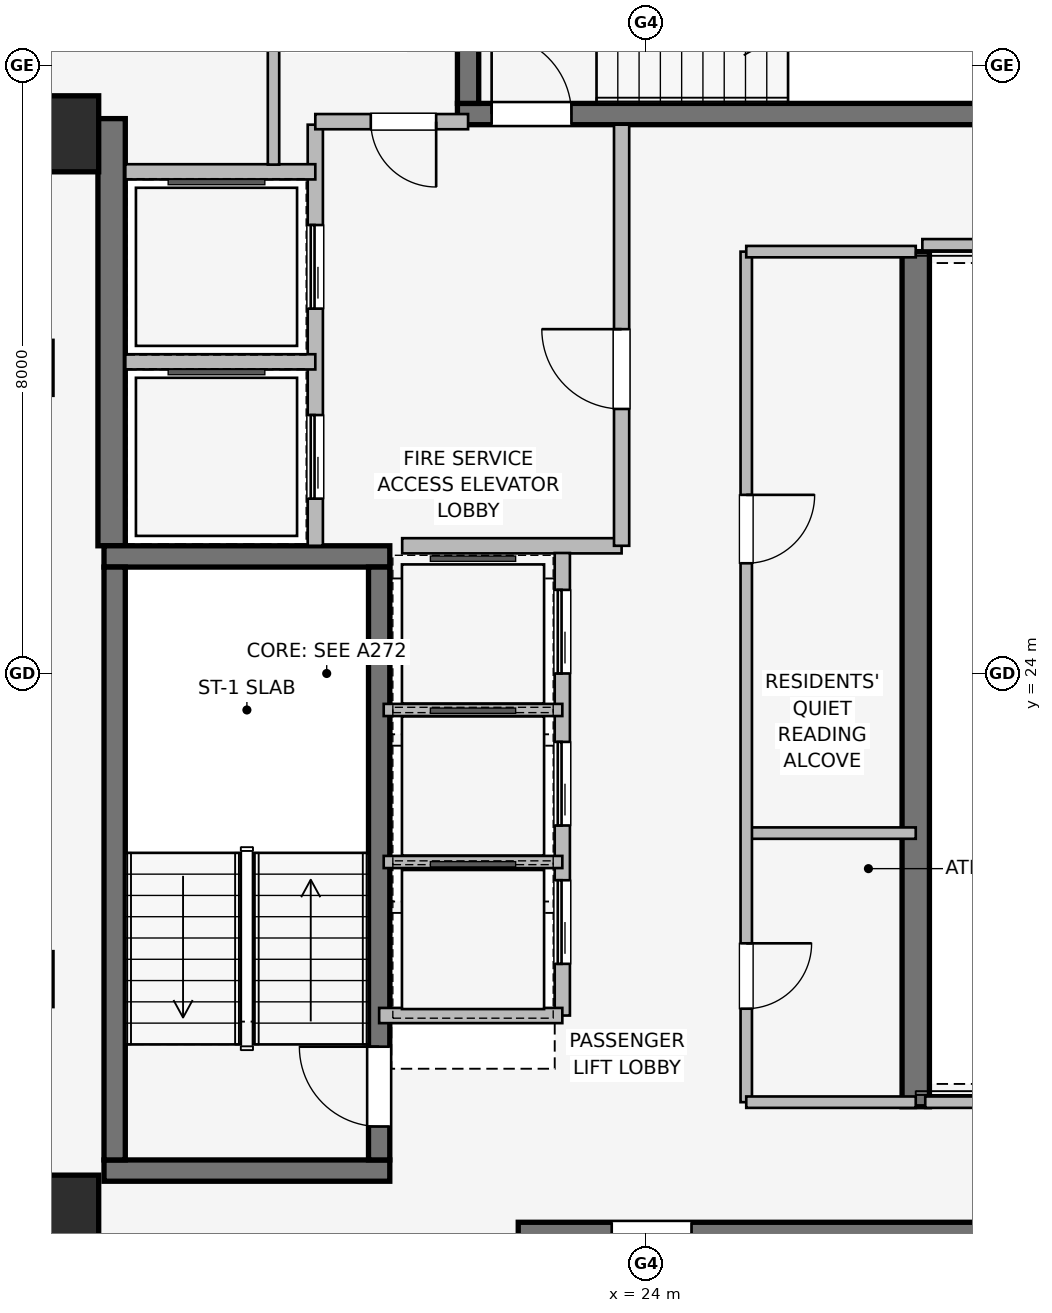
"""IFC4 building model, lengths in metres.
Left out: names, types, materials, properties, quantities, classifications, styles, units other than length and angle.
Written with IfcOpenShell. Run it as: python <this file> out.ifc"""

import sys

from ifc_helpers import new_model, si_unit, direction, frame, frame_2d, origin, origin_2d, place, context, subcontext, project, spatial, rectangle, extrude, element, fill, save


model = new_model("IFC4")
c1 = context("Model", 3, precision=1e-05, world=origin(), true_north=direction((0.0, 1.0)))
c2 = subcontext(c1, "Body", "Model", "MODEL_VIEW")
j1 = project(units=[si_unit("LENGTHUNIT", "METRE"), si_unit("PLANEANGLEUNIT", "RADIAN")], contexts=[c1])
p1 = place(None, origin())
s1 = spatial("IfcSite", under=j1, at=p1, CompositionType="ELEMENT")
p2 = place(p1, origin())
s2 = spatial("IfcBuilding", under=s1, at=p2, CompositionType="ELEMENT")
p3 = place(p2, frame((0.0, 0.0, 256.1)))
s3 = spatial("IfcBuildingStorey", under=s2, at=p3, CompositionType="ELEMENT", Elevation=256.1)
p4 = place(p3, frame((16.97, 25.68, 0.0), z_axis=(0.0, 0.0, 1.0), x_axis=(0.0, 1.0, 0.0)))
e1 = element("IfcWall", 1, at=p4, inside=s3, PredefinedType="SHEAR", context=c2, shape_type="SweptSolid", body=[
    extrude(rectangle(XDim=5.62, YDim=0.36, at=frame_2d((2.81, 0.0))), origin(), (0.0, 0.0, 1.0), 3.55),
])
p5 = place(p3, frame((27.55, 29.55, 0.0), z_axis=(0.0, 0.0, 1.0), x_axis=(0.0, -1.0, 0.0)))
e2 = element("IfcWall", 2, at=p5, inside=s3, PredefinedType="SHEAR", context=c2, shape_type="SweptSolid", body=[
    extrude(rectangle(XDim=11.25, YDim=0.36, at=frame_2d((5.625, 0.0))), origin(), (0.0, 0.0, 1.0), 3.55),
])
for number, where, z_axis, x_axis in (
    (3, (16.87, 17.46, 0.0), (0.0, 0.0, 1.0), (1.0, 0.0, 0.0)),
    (4, (20.63, 25.54, 0.0), (0.0, 0.0, 1.0), (-1.0, 0.0, 0.0)),
):
    element("IfcWall", number, at=place(p3, frame(where, z_axis=z_axis, x_axis=x_axis)), inside=s3, PredefinedType="SHEAR", context=c2, shape_type="SweptSolid", body=[
        extrude(rectangle(XDim=3.76, YDim=0.28, at=frame_2d((1.88, 0.0))), origin(), (0.0, 0.0, 1.0), 3.55),
    ])
p6 = place(p3, frame((17.01, 25.4, 0.0), z_axis=(0.0, 0.0, 1.0), x_axis=(0.0, -1.0, 0.0)))
e5 = element("IfcWall", 5, at=p6, inside=s3, PredefinedType="SHEAR", context=c2, shape_type="SweptSolid", body=[
    extrude(rectangle(XDim=7.8, YDim=0.28, at=frame_2d((3.9, 0.0))), origin(), (0.0, 0.0, 1.0), 3.55),
])
p7 = place(p3, frame((20.49, 17.6, 0.0), z_axis=(0.0, 0.0, 1.0), x_axis=(0.0, 1.0, 0.0)))
e6 = element("IfcWall", 6, at=p7, inside=s3, PredefinedType="SHEAR", context=c2, shape_type="SweptSolid", body=[
    extrude(rectangle(XDim=7.8, YDim=0.28, at=frame_2d((3.9, 0.0))), origin(), (0.0, 0.0, 1.0), 3.55),
])
p8 = place(p7, frame((0.44, 0.0, 0.0)))
e7 = element("IfcOpeningElement", 7, at=p8, cuts=e6, PredefinedType="OPENING", context=c2, shape_type="SweptSolid", body=[
    extrude(rectangle(XDim=1.05, YDim=2.0, at=frame_2d((0.525, 1.0))), frame((0.0, 0.15, 0.0), z_axis=(0.0, -1.0, 0.0), x_axis=(1.0, 0.0, 0.0)), (0.0, 0.0, 1.0), 0.3),
])
p9 = place(p3, frame((30.68, 16.64, 0.0), z_axis=(0.0, 0.0, 1.0), x_axis=(-1.0, 0.0, 0.0)))
e8 = element("IfcWall", 8, at=p9, inside=s3, PredefinedType="SHEAR", context=c2, shape_type="SweptSolid", body=[
    extrude(rectangle(XDim=8.36, YDim=0.28, at=frame_2d((4.18, 0.0))), origin(), (0.0, 0.0, 1.0), 3.55),
])
p10 = place(p9, frame((6.08, 0.0, 0.0)))
e9 = element("IfcOpeningElement", 9, at=p10, cuts=e8, PredefinedType="OPENING", context=c2, shape_type="SweptSolid", body=[
    extrude(rectangle(XDim=1.05, YDim=2.0, at=frame_2d((0.525, 1.0))), frame((0.0, 0.15, 0.0), z_axis=(0.0, -1.0, 0.0), x_axis=(1.0, 0.0, 0.0)), (0.0, 0.0, 1.0), 0.3),
])
p11 = place(p3, frame((21.52, 31.36, 0.0), z_axis=(0.0, 0.0, 1.0), x_axis=(1.0, 0.0, 0.0)))
e10 = element("IfcWall", 10, at=p11, inside=s3, PredefinedType="SHEAR", context=c2, shape_type="SweptSolid", body=[
    extrude(rectangle(XDim=8.36, YDim=0.28, at=frame_2d((4.18, 0.0))), origin(), (0.0, 0.0, 1.0), 3.55),
])
p12 = place(p11, frame((0.45, 0.0, 0.0)))
e11 = element("IfcOpeningElement", 11, at=p12, cuts=e10, PredefinedType="OPENING", context=c2, shape_type="SweptSolid", body=[
    extrude(rectangle(XDim=1.05, YDim=2.0, at=frame_2d((0.525, 1.0))), frame((0.0, 0.15, 0.0), z_axis=(0.0, -1.0, 0.0), x_axis=(1.0, 0.0, 0.0)), (0.0, 0.0, 1.0), 0.3),
])
p13 = place(p3, frame((21.66, 34.7, 0.0), z_axis=(0.0, 0.0, 1.0), x_axis=(0.0, -1.0, 0.0)))
e12 = element("IfcWall", 12, at=p13, inside=s3, PredefinedType="SHEAR", context=c2, shape_type="SweptSolid", body=[
    extrude(rectangle(XDim=3.2, YDim=0.28, at=frame_2d((1.6, 0.0))), origin(), (0.0, 0.0, 1.0), 3.55),
])
for number, where, z_axis, x_axis in (
    (13, (16.3, 16.9, 0.0), (0.0, 0.0, 1.0), (1.0, 0.0, 0.0)),
    (14, (16.3, 31.1, 0.0), (0.0, 0.0, 1.0), (1.0, 0.0, 0.0)),
):
    element("IfcColumn", number, at=place(p3, frame(where, z_axis=z_axis, x_axis=x_axis)), inside=s3, PredefinedType="COLUMN", context=c2, shape_type="SweptSolid", body=[
        extrude(rectangle(XDim=1.0, YDim=1.0, at=origin_2d()), origin(), (0.0, 0.0, 1.0), 3.55),
    ])
p14 = place(p3, frame((15.574, 32.082, 0.0), z_axis=(0.0, 0.0, 1.0), x_axis=(0.520325409202, 0.853968072318, 0.0)))
e15 = element("IfcWall", 15, at=p14, inside=s3, PredefinedType="STANDARD", context=c2, shape_type="SweptSolid", body=[
    extrude(rectangle(XDim=1.678, YDim=0.33, at=frame_2d((0.839, 0.0))), origin(), (0.0, 0.0, 1.0), 3.29),
])
p15 = place(p3, frame((19.65, 25.68, 0.0), z_axis=(0.0, 0.0, 1.0), x_axis=(0.0, 1.0, 0.0)))
e16 = element("IfcWall", 16, at=p15, inside=s3, PredefinedType="PARTITIONING", context=c2, shape_type="SweptSolid", body=[
    extrude(rectangle(XDim=5.54, YDim=0.2, at=frame_2d((2.77, 0.0))), origin(), (0.0, 0.0, 1.0), 3.29),
])
p16 = place(p15, frame((0.62, 0.0, 0.0)))
e17 = element("IfcOpeningElement", 17, at=p16, cuts=e16, PredefinedType="OPENING", context=c2, shape_type="SweptSolid", body=[
    extrude(rectangle(XDim=1.1, YDim=2.2, at=frame_2d((0.55, 1.1))), frame((0.0, 0.11, 0.0), z_axis=(0.0, -1.0, 0.0), x_axis=(1.0, 0.0, 0.0)), (0.0, 0.0, 1.0), 0.22),
])
p17 = place(p15, frame((3.12, 0.0, 0.0)))
e18 = element("IfcOpeningElement", 18, at=p17, cuts=e16, PredefinedType="OPENING", context=c2, shape_type="SweptSolid", body=[
    extrude(rectangle(XDim=1.1, YDim=2.2, at=frame_2d((0.55, 1.1))), frame((0.0, 0.11, 0.0), z_axis=(0.0, -1.0, 0.0), x_axis=(1.0, 0.0, 0.0)), (0.0, 0.0, 1.0), 0.22),
])
p18 = place(p3, frame((20.793, 25.68, 0.0), z_axis=(0.0, 0.0, 1.0), x_axis=(1.0, 0.0, 0.0)))
e19 = element("IfcWall", 19, at=p18, inside=s3, PredefinedType="PARTITIONING", context=c2, shape_type="SweptSolid", body=[
    extrude(rectangle(XDim=2.887, YDim=0.2, at=frame_2d((1.443, 0.0))), origin(), (0.0, 0.0, 1.0), 3.29),
])
p19 = place(p3, frame((23.68, 25.68, 0.0), z_axis=(0.0, 0.0, 1.0), x_axis=(0.0, 1.0, 0.0)))
e20 = element("IfcWall", 20, at=p19, inside=s3, PredefinedType="PARTITIONING", context=c2, shape_type="SweptSolid", body=[
    extrude(rectangle(XDim=5.54, YDim=0.2, at=frame_2d((2.77, 0.0))), origin(), (0.0, 0.0, 1.0), 3.29),
])
p20 = place(p19, frame((1.8, 0.0, 0.0)))
e21 = element("IfcOpeningElement", 21, at=p20, cuts=e20, PredefinedType="OPENING", context=c2, shape_type="SweptSolid", body=[
    extrude(rectangle(XDim=1.05, YDim=2.0, at=frame_2d((0.525, 1.0))), frame((0.0, 0.11, 0.0), z_axis=(0.0, -1.0, 0.0), x_axis=(1.0, 0.0, 0.0)), (0.0, 0.0, 1.0), 0.22),
])
p21 = place(p3, frame((21.66, 31.26, 0.0), z_axis=(0.0, 0.0, 1.0), x_axis=(-1.0, 0.0, 0.0)))
e22 = element("IfcWall", 22, at=p21, inside=s3, PredefinedType="PARTITIONING", context=c2, shape_type="SweptSolid", body=[
    extrude(rectangle(XDim=2.01, YDim=0.2, at=frame_2d((1.005, 0.0))), origin(), (0.0, 0.0, 1.0), 3.29),
])
p22 = place(p21, frame((0.42, 0.0, 0.0)))
e23 = element("IfcOpeningElement", 23, at=p22, cuts=e22, PredefinedType="OPENING", context=c2, shape_type="SweptSolid", body=[
    extrude(rectangle(XDim=0.86, YDim=2.0, at=frame_2d((0.43, 1.0))), frame((0.0, 0.11, 0.0), z_axis=(0.0, -1.0, 0.0), x_axis=(1.0, 0.0, 0.0)), (0.0, 0.0, 1.0), 0.22),
])
p23 = place(p3, frame((17.15, 28.1, 0.0), z_axis=(0.0, 0.0, 1.0), x_axis=(1.0, 0.0, 0.0)))
e24 = element("IfcWall", 24, at=p23, inside=s3, PredefinedType="PARTITIONING", context=c2, shape_type="SweptSolid", body=[
    extrude(rectangle(XDim=2.5, YDim=0.2, at=frame_2d((1.25, 0.0))), origin(), (0.0, 0.0, 1.0), 3.29),
])
p24 = place(p3, frame((19.65, 30.6, 0.0), z_axis=(0.0, 0.0, 1.0), x_axis=(-1.0, 0.0, 0.0)))
e25 = element("IfcWall", 25, at=p24, inside=s3, PredefinedType="PARTITIONING", context=c2, shape_type="SweptSolid", body=[
    extrude(rectangle(XDim=2.5, YDim=0.2, at=frame_2d((1.25, 0.0))), origin(), (0.0, 0.0, 1.0), 2.19),
])
p25 = place(p3, frame((22.9, 19.5, 0.0), z_axis=(0.0, 0.0, 1.0), x_axis=(0.0, 1.0, 0.0)))
e26 = element("IfcWall", 26, at=p25, inside=s3, PredefinedType="PARTITIONING", context=c2, shape_type="SweptSolid", body=[
    extrude(rectangle(XDim=6.085, YDim=0.2, at=frame_2d((3.042, 0.0))), origin(), (0.0, 0.0, 1.0), 3.29),
])
p26 = place(p25, frame((0.68, 0.0, 0.0)))
e27 = element("IfcOpeningElement", 27, at=p26, cuts=e26, PredefinedType="OPENING", context=c2, shape_type="SweptSolid", body=[
    extrude(rectangle(XDim=1.1, YDim=2.2, at=frame_2d((0.55, 1.1))), frame((0.0, 0.11, 0.0), z_axis=(0.0, -1.0, 0.0), x_axis=(1.0, 0.0, 0.0)), (0.0, 0.0, 1.0), 0.22),
])
p27 = place(p25, frame((2.5, 0.0, 0.0)))
e28 = element("IfcOpeningElement", 28, at=p27, cuts=e26, PredefinedType="OPENING", context=c2, shape_type="SweptSolid", body=[
    extrude(rectangle(XDim=1.1, YDim=2.2, at=frame_2d((0.55, 1.1))), frame((0.0, 0.11, 0.0), z_axis=(0.0, -1.0, 0.0), x_axis=(1.0, 0.0, 0.0)), (0.0, 0.0, 1.0), 0.22),
])
p28 = place(p25, frame((4.5, 0.0, 0.0)))
e29 = element("IfcOpeningElement", 29, at=p28, cuts=e26, PredefinedType="OPENING", context=c2, shape_type="SweptSolid", body=[
    extrude(rectangle(XDim=1.1, YDim=2.2, at=frame_2d((0.55, 1.1))), frame((0.0, 0.11, 0.0), z_axis=(0.0, -1.0, 0.0), x_axis=(1.0, 0.0, 0.0)), (0.0, 0.0, 1.0), 0.22),
])
p29 = place(p3, frame((20.49, 19.5, 0.0), z_axis=(0.0, 0.0, 1.0), x_axis=(1.0, 0.0, 0.0)))
e30 = element("IfcWall", 30, at=p29, inside=s3, PredefinedType="PARTITIONING", context=c2, shape_type="SweptSolid", body=[
    extrude(rectangle(XDim=2.41, YDim=0.2, at=frame_2d((1.205, 0.0))), origin(), (0.0, 0.0, 1.0), 2.19),
])
for number, where, z_axis, x_axis in (
    (31, (20.55, 21.52, 0.0), (0.0, 0.0, 1.0), (1.0, 0.0, 0.0)),
    (32, (20.55, 23.52, 0.0), (0.0, 0.0, 1.0), (1.0, 0.0, 0.0)),
):
    element("IfcWall", number, at=place(p3, frame(where, z_axis=z_axis, x_axis=x_axis)), inside=s3, PredefinedType="PARTITIONING", context=c2, shape_type="SweptSolid", body=[
        extrude(rectangle(XDim=2.35, YDim=0.16, at=frame_2d((1.175, 0.0))), origin(), (0.0, 0.0, 1.0), 3.29),
    ])
p30 = place(p3, frame((25.32, 21.9, 0.0), z_axis=(0.0, 0.0, 1.0), x_axis=(1.0, 0.0, 0.0)))
e33 = element("IfcWall", 33, at=p30, inside=s3, PredefinedType="PARTITIONING", context=c2, shape_type="SweptSolid", body=[
    extrude(rectangle(XDim=2.23, YDim=0.15, at=frame_2d((1.115, 0.0))), origin(), (0.0, 0.0, 1.0), 3.29),
])
p31 = place(p3, frame((25.32, 29.55, 0.0), z_axis=(0.0, 0.0, 1.0), x_axis=(0.0, -1.0, 0.0)))
e34 = element("IfcWall", 34, at=p31, inside=s3, PredefinedType="PARTITIONING", context=c2, shape_type="SweptSolid", body=[
    extrude(rectangle(XDim=11.19, YDim=0.15, at=frame_2d((5.595, 0.0))), origin(), (0.0, 0.0, 1.0), 3.29),
])
p32 = place(p31, frame((3.2, 0.0, 0.0)))
e35 = element("IfcOpeningElement", 35, at=p32, cuts=e34, PredefinedType="OPENING", context=c2, shape_type="SweptSolid", body=[
    extrude(rectangle(XDim=0.9, YDim=2.0, at=frame_2d((0.45, 1.0))), frame((0.0, 0.085, 0.0), z_axis=(0.0, -1.0, 0.0), x_axis=(1.0, 0.0, 0.0)), (0.0, 0.0, 1.0), 0.17),
])
p33 = place(p31, frame((9.1, 0.0, 0.0)))
e36 = element("IfcOpeningElement", 36, at=p33, cuts=e34, PredefinedType="OPENING", context=c2, shape_type="SweptSolid", body=[
    extrude(rectangle(XDim=0.86, YDim=2.0, at=frame_2d((0.43, 1.0))), frame((0.0, 0.085, 0.0), z_axis=(0.0, -1.0, 0.0), x_axis=(1.0, 0.0, 0.0)), (0.0, 0.0, 1.0), 0.17),
])
p34 = place(p3, frame((25.32, 18.36, 0.0), z_axis=(0.0, 0.0, 1.0), x_axis=(1.0, 0.0, 0.0)))
e37 = element("IfcWall", 37, at=p34, inside=s3, PredefinedType="PARTITIONING", context=c2, shape_type="SweptSolid", body=[
    extrude(rectangle(XDim=2.23, YDim=0.15, at=frame_2d((1.115, 0.0))), origin(), (0.0, 0.0, 1.0), 3.29),
])
p35 = place(p3, frame((27.55, 29.55, 0.0), z_axis=(0.0, 0.0, 1.0), x_axis=(-1.0, 0.0, 0.0)))
e38 = element("IfcWall", 38, at=p35, inside=s3, PredefinedType="PARTITIONING", context=c2, shape_type="SweptSolid", body=[
    extrude(rectangle(XDim=2.23, YDim=0.15, at=frame_2d((1.115, 0.0))), origin(), (0.0, 0.0, 1.0), 2.19),
])
p36 = place(p3, frame((19.1, 33.35, 0.0), z_axis=(0.0, 0.0, 1.0), x_axis=(0.0, -1.0, 0.0)))
e39 = element("IfcWall", 39, at=p36, inside=s3, PredefinedType="PARTITIONING", context=c2, shape_type="SweptSolid", body=[
    extrude(rectangle(XDim=2.655, YDim=0.15, at=frame_2d((1.328, 0.0))), origin(), (0.0, 0.0, 1.0), 3.29),
])
p37 = place(p3, frame((27.675, 18.36, 0.0), z_axis=(0.0, 0.0, 1.0), x_axis=(1.0, 0.0, 0.0)))
e40 = element("IfcWall", 40, at=p37, inside=s3, PredefinedType="PARTITIONING", context=c2, shape_type="SweptSolid", body=[
    extrude(rectangle(XDim=12.165, YDim=0.15, at=frame_2d((6.083, 0.0))), origin(), (0.0, 0.0, 1.0), 2.431),
])
p38 = place(p3, frame((39.84, 29.64, 0.0), z_axis=(0.0, 0.0, 1.0), x_axis=(-1.0, 0.0, 0.0)))
e41 = element("IfcWall", 41, at=p38, inside=s3, PredefinedType="PARTITIONING", context=c2, shape_type="SweptSolid", body=[
    extrude(rectangle(XDim=12.203, YDim=0.15, at=frame_2d((6.102, 0.0))), origin(), (0.0, 0.0, 1.0), 2.431),
])
p39 = place(p8, origin())
e42 = element("IfcDoor", 42, at=p39, inside=s3, OperationType="SINGLE_SWING_RIGHT", PredefinedType="DOOR", context=c2, shape_type="SweptSolid", body=[
    extrude(rectangle(XDim=1.05, YDim=2.0, at=frame_2d((0.525, 1.0))), frame((0.0, 0.025, 0.0), z_axis=(0.0, -1.0, 0.0), x_axis=(1.0, 0.0, 0.0)), (0.0, 0.0, 1.0), 0.05),
])
fill(e7, e42)
p40 = place(p10, origin())
e43 = element("IfcDoor", 43, at=p40, inside=s3, OperationType="SINGLE_SWING_RIGHT", PredefinedType="DOOR", context=c2, shape_type="SweptSolid", body=[
    extrude(rectangle(XDim=1.05, YDim=2.0, at=frame_2d((0.525, 1.0))), frame((0.0, 0.025, 0.0), z_axis=(0.0, -1.0, 0.0), x_axis=(1.0, 0.0, 0.0)), (0.0, 0.0, 1.0), 0.05),
])
fill(e9, e43)
p41 = place(p12, origin())
e44 = element("IfcDoor", 44, at=p41, inside=s3, OperationType="SINGLE_SWING_LEFT", PredefinedType="DOOR", context=c2, shape_type="SweptSolid", body=[
    extrude(rectangle(XDim=1.05, YDim=2.0, at=frame_2d((0.525, 1.0))), frame((0.0, 0.025, 0.0), z_axis=(0.0, -1.0, 0.0), x_axis=(1.0, 0.0, 0.0)), (0.0, 0.0, 1.0), 0.05),
])
fill(e11, e44)
p42 = place(p16, origin())
e45 = element("IfcDoor", 45, at=p42, inside=s3, OperationType="SLIDING_TO_LEFT", PredefinedType="DOOR", context=c2, shape_type="SweptSolid", body=[
    extrude(rectangle(XDim=1.1, YDim=2.2, at=frame_2d((0.55, 1.1))), frame((0.0, 0.025, 0.0), z_axis=(0.0, -1.0, 0.0), x_axis=(1.0, 0.0, 0.0)), (0.0, 0.0, 1.0), 0.05),
])
fill(e17, e45)
p43 = place(p17, origin())
e46 = element("IfcDoor", 46, at=p43, inside=s3, OperationType="SLIDING_TO_LEFT", PredefinedType="DOOR", context=c2, shape_type="SweptSolid", body=[
    extrude(rectangle(XDim=1.1, YDim=2.2, at=frame_2d((0.55, 1.1))), frame((0.0, 0.025, 0.0), z_axis=(0.0, -1.0, 0.0), x_axis=(1.0, 0.0, 0.0)), (0.0, 0.0, 1.0), 0.05),
])
fill(e18, e46)
p44 = place(p20, origin())
e47 = element("IfcDoor", 47, at=p44, inside=s3, OperationType="SINGLE_SWING_RIGHT", PredefinedType="DOOR", context=c2, shape_type="SweptSolid", body=[
    extrude(rectangle(XDim=1.05, YDim=2.0, at=frame_2d((0.525, 1.0))), frame((0.0, 0.025, 0.0), z_axis=(0.0, -1.0, 0.0), x_axis=(1.0, 0.0, 0.0)), (0.0, 0.0, 1.0), 0.05),
])
fill(e21, e47)
p45 = place(p22, origin())
e48 = element("IfcDoor", 48, at=p45, inside=s3, OperationType="SINGLE_SWING_LEFT", PredefinedType="DOOR", context=c2, shape_type="SweptSolid", body=[
    extrude(rectangle(XDim=0.86, YDim=2.0, at=frame_2d((0.43, 1.0))), frame((0.0, 0.025, 0.0), z_axis=(0.0, -1.0, 0.0), x_axis=(1.0, 0.0, 0.0)), (0.0, 0.0, 1.0), 0.05),
])
fill(e23, e48)
p46 = place(p26, origin())
e49 = element("IfcDoor", 49, at=p46, inside=s3, OperationType="SLIDING_TO_LEFT", PredefinedType="DOOR", context=c2, shape_type="SweptSolid", body=[
    extrude(rectangle(XDim=1.1, YDim=2.2, at=frame_2d((0.55, 1.1))), frame((0.0, 0.025, 0.0), z_axis=(0.0, -1.0, 0.0), x_axis=(1.0, 0.0, 0.0)), (0.0, 0.0, 1.0), 0.05),
])
fill(e27, e49)
p47 = place(p27, origin())
e50 = element("IfcDoor", 50, at=p47, inside=s3, OperationType="SLIDING_TO_LEFT", PredefinedType="DOOR", context=c2, shape_type="SweptSolid", body=[
    extrude(rectangle(XDim=1.1, YDim=2.2, at=frame_2d((0.55, 1.1))), frame((0.0, 0.025, 0.0), z_axis=(0.0, -1.0, 0.0), x_axis=(1.0, 0.0, 0.0)), (0.0, 0.0, 1.0), 0.05),
])
fill(e28, e50)
p48 = place(p28, origin())
e51 = element("IfcDoor", 51, at=p48, inside=s3, OperationType="SLIDING_TO_LEFT", PredefinedType="DOOR", context=c2, shape_type="SweptSolid", body=[
    extrude(rectangle(XDim=1.1, YDim=2.2, at=frame_2d((0.55, 1.1))), frame((0.0, 0.025, 0.0), z_axis=(0.0, -1.0, 0.0), x_axis=(1.0, 0.0, 0.0)), (0.0, 0.0, 1.0), 0.05),
])
fill(e29, e51)
p49 = place(p32, origin())
e52 = element("IfcDoor", 52, at=p49, inside=s3, OperationType="SINGLE_SWING_LEFT", PredefinedType="DOOR", context=c2, shape_type="SweptSolid", body=[
    extrude(rectangle(XDim=0.9, YDim=2.0, at=frame_2d((0.45, 1.0))), frame((0.0, 0.025, 0.0), z_axis=(0.0, -1.0, 0.0), x_axis=(1.0, 0.0, 0.0)), (0.0, 0.0, 1.0), 0.05),
])
fill(e35, e52)
p50 = place(p33, origin())
e53 = element("IfcDoor", 53, at=p50, inside=s3, OperationType="SINGLE_SWING_LEFT", PredefinedType="DOOR", context=c2, shape_type="SweptSolid", body=[
    extrude(rectangle(XDim=0.86, YDim=2.0, at=frame_2d((0.43, 1.0))), frame((0.0, 0.025, 0.0), z_axis=(0.0, -1.0, 0.0), x_axis=(1.0, 0.0, 0.0)), (0.0, 0.0, 1.0), 0.05),
])
fill(e36, e53)
save(model, sys.argv[1])
